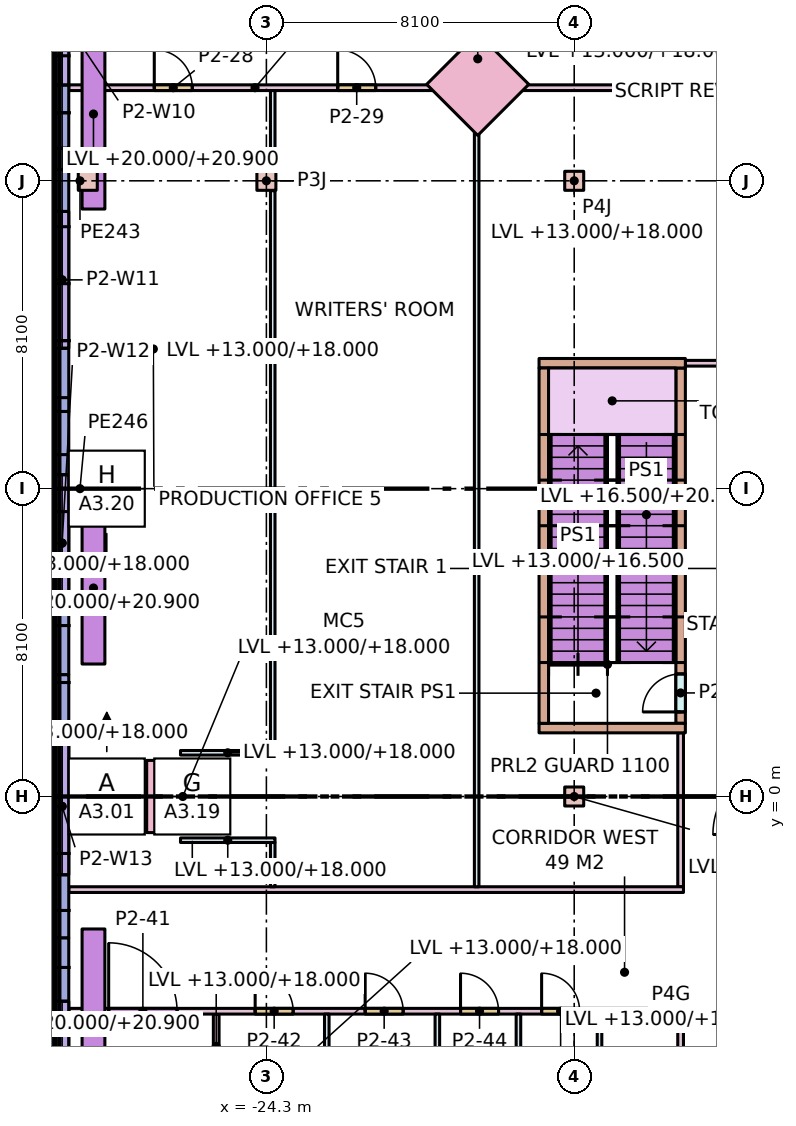
"""IFC4 building model, lengths in metres.
Left out: names, types, materials, properties, quantities, classifications, styles, units other than length and angle.
Written with IfcOpenShell. Run it as: python <this file> out.ifc"""

import sys

from ifc_helpers import new_model, si_unit, direction, frame, frame_2d, origin, origin_2d, place, context, subcontext, project, spatial, rectangle, extrude, element, fill, save


model = new_model("IFC4")
c1 = context("Model", 3, precision=1e-05, world=origin(), true_north=direction((0.0, 1.0)))
c2 = subcontext(c1, "Body", "Model", "MODEL_VIEW")
j1 = project(units=[si_unit("LENGTHUNIT", "METRE"), si_unit("PLANEANGLEUNIT", "RADIAN")], contexts=[c1])
p1 = place(None, origin())
s1 = spatial("IfcSite", under=j1, at=p1, CompositionType="ELEMENT")
p2 = place(p1, origin())
s2 = spatial("IfcBuilding", under=s1, at=p2, CompositionType="ELEMENT")
p3 = place(p2, frame((0.0, 0.0, 13.0)))
s3 = spatial("IfcBuildingStorey", under=s2, at=p3, CompositionType="ELEMENT", Elevation=13.0)
p4 = place(p3, frame((-24.3, 16.2, 0.0), z_axis=(0.0, 0.0, 1.0), x_axis=(1.0, 0.0, 0.0)))
e1 = element("IfcColumn", 1, at=p4, inside=s3, PredefinedType="COLUMN", context=c2, shape_type="SweptSolid", body=[
    extrude(rectangle(XDim=0.5, YDim=0.5, at=origin_2d()), origin(), (0.0, 0.0, 1.0), 7.0),
])
for number, where, z_axis, x_axis in (
    (2, (-16.2, 0.0, 0.0), (0.0, 0.0, 1.0), (1.0, 0.0, 0.0)),
    (3, (-16.2, 16.2, 0.0), (0.0, 0.0, 1.0), (1.0, 0.0, 0.0)),
):
    element("IfcColumn", number, at=place(p3, frame(where, z_axis=z_axis, x_axis=x_axis)), inside=s3, PredefinedType="COLUMN", context=c2, shape_type="SweptSolid", body=[
        extrude(rectangle(XDim=0.5, YDim=0.5, at=origin_2d()), origin(), (0.0, 0.0, 1.0), 5.0),
    ])
for number, where, z_axis, x_axis in (
    (4, (-29.0, 16.2, 0.0), (0.0, 0.0, 1.0), (1.0, 0.0, 0.0)),
    (5, (-29.0, 8.1, 0.0), (0.0, 0.0, 1.0), (1.0, 0.0, 0.0)),
):
    element("IfcColumn", number, at=place(p3, frame(where, z_axis=z_axis, x_axis=x_axis)), inside=s3, PredefinedType="COLUMN", context=c2, shape_type="SweptSolid", body=[
        extrude(rectangle(XDim=0.5, YDim=0.5, at=origin_2d()), origin(), (0.0, 0.0, 1.0), 7.0),
    ])
for number, where, z_axis, x_axis in (
    (6, (-18.738, 18.738, 0.0), (0.0, 0.0, 1.0), (-0.707, -0.707, 0.0)),
    (7, (-26.5, 0.0, 0.0), (0.0, 0.0, 1.0), (0.0, -1.0, 0.0)),
):
    element("IfcColumn", number, at=place(p3, frame(where, z_axis=z_axis, x_axis=x_axis)), inside=s3, PredefinedType="COLUMN", context=c2, shape_type="SweptSolid", body=[
        extrude(rectangle(XDim=1.9, YDim=1.9, at=origin_2d()), origin(), (0.0, 0.0, 1.0), 5.0),
    ])
p5 = place(p3, frame((-29.675, 23.984, 0.0), z_axis=(0.0, 0.0, 1.0), x_axis=(0.0, -1.0, 0.0)))
e8 = element("IfcWall", 8, at=p5, inside=s3, PredefinedType="STANDARD", context=c2, shape_type="SweptSolid", body=[
    extrude(rectangle(XDim=6.927, YDim=0.35, at=frame_2d((3.463, 0.0))), origin(), (0.0, 0.0, 1.0), 5.0),
])
p6 = place(p5, frame((1.663, 0.0, 1.0)))
e9 = element("IfcOpeningElement", 9, at=p6, cuts=e8, PredefinedType="OPENING", context=c2, shape_type="SweptSolid", body=[
    extrude(rectangle(XDim=3.6, YDim=4.0, at=frame_2d((1.8, 2.0))), frame((0.0, 0.185, 0.0), z_axis=(0.0, -1.0, 0.0), x_axis=(1.0, 0.0, 0.0)), (0.0, 0.0, 1.0), 0.37),
])
p7 = place(p3, frame((-29.675, 17.057, 0.0), z_axis=(0.0, 0.0, 1.0), x_axis=(0.0, -1.0, 0.0)))
e10 = element("IfcWall", 10, at=p7, inside=s3, PredefinedType="STANDARD", context=c2, shape_type="SweptSolid", body=[
    extrude(rectangle(XDim=6.927, YDim=0.35, at=frame_2d((3.463, 0.0))), origin(), (0.0, 0.0, 1.0), 5.0),
])
p8 = place(p7, frame((1.663, 0.0, 1.0)))
e11 = element("IfcOpeningElement", 11, at=p8, cuts=e10, PredefinedType="OPENING", context=c2, shape_type="SweptSolid", body=[
    extrude(rectangle(XDim=3.6, YDim=4.0, at=frame_2d((1.8, 2.0))), frame((0.0, 0.185, 0.0), z_axis=(0.0, -1.0, 0.0), x_axis=(1.0, 0.0, 0.0)), (0.0, 0.0, 1.0), 0.37),
])
p9 = place(p3, frame((-29.675, 10.13, 0.0), z_axis=(0.0, 0.0, 1.0), x_axis=(0.0, -1.0, 0.0)))
e12 = element("IfcWall", 12, at=p9, inside=s3, PredefinedType="STANDARD", context=c2, shape_type="SweptSolid", body=[
    extrude(rectangle(XDim=6.927, YDim=0.35, at=frame_2d((3.463, 0.0))), origin(), (0.0, 0.0, 1.0), 5.0),
])
p10 = place(p9, frame((1.663, 0.0, 1.0)))
e13 = element("IfcOpeningElement", 13, at=p10, cuts=e12, PredefinedType="OPENING", context=c2, shape_type="SweptSolid", body=[
    extrude(rectangle(XDim=3.6, YDim=4.0, at=frame_2d((1.8, 2.0))), frame((0.0, 0.185, 0.0), z_axis=(0.0, -1.0, 0.0), x_axis=(1.0, 0.0, 0.0)), (0.0, 0.0, 1.0), 0.37),
])
p11 = place(p3, frame((-29.675, 3.204, 0.0), z_axis=(0.0, 0.0, 1.0), x_axis=(0.0, -1.0, 0.0)))
e14 = element("IfcWall", 14, at=p11, inside=s3, PredefinedType="STANDARD", context=c2, shape_type="SweptSolid", body=[
    extrude(rectangle(XDim=6.927, YDim=0.35, at=frame_2d((3.463, 0.0))), origin(), (0.0, 0.0, 1.0), 5.0),
])
p12 = place(p11, frame((1.663, 0.0, 1.0)))
e15 = element("IfcOpeningElement", 15, at=p12, cuts=e14, PredefinedType="OPENING", context=c2, shape_type="SweptSolid", body=[
    extrude(rectangle(XDim=3.6, YDim=4.0, at=frame_2d((1.8, 2.0))), frame((0.0, 0.185, 0.0), z_axis=(0.0, -1.0, 0.0), x_axis=(1.0, 0.0, 0.0)), (0.0, 0.0, 1.0), 0.37),
])
p13 = place(p3, frame((-29.675, -3.723, 0.0), z_axis=(0.0, 0.0, 1.0), x_axis=(0.0, -1.0, 0.0)))
e16 = element("IfcWall", 16, at=p13, inside=s3, PredefinedType="STANDARD", context=c2, shape_type="SweptSolid", body=[
    extrude(rectangle(XDim=6.927, YDim=0.35, at=frame_2d((3.463, 0.0))), origin(), (0.0, 0.0, 1.0), 5.0),
])
p14 = place(p13, frame((1.663, 0.0, 1.0)))
e17 = element("IfcOpeningElement", 17, at=p14, cuts=e16, PredefinedType="OPENING", context=c2, shape_type="SweptSolid", body=[
    extrude(rectangle(XDim=3.6, YDim=4.0, at=frame_2d((1.8, 2.0))), frame((0.0, 0.185, 0.0), z_axis=(0.0, -1.0, 0.0), x_axis=(1.0, 0.0, 0.0)), (0.0, 0.0, 1.0), 0.37),
])
for number, where, z_axis, x_axis in (
    (18, (-28.85, 20.458, 7.0), (0.0, 0.0, 1.0), (0.0, -1.0, 0.0)),
    (19, (-28.85, 8.486, 7.0), (0.0, 0.0, 1.0), (0.0, -1.0, 0.0)),
    (20, (-28.85, -3.486, 7.0), (0.0, 0.0, 1.0), (0.0, -1.0, 0.0)),
):
    element("IfcWall", number, at=place(p3, frame(where, z_axis=z_axis, x_axis=x_axis)), inside=s3, PredefinedType="PARAPET", context=c2, shape_type="SweptSolid", body=[
        extrude(rectangle(XDim=5.0, YDim=0.6, at=frame_2d((2.5, 0.0))), origin(), (0.0, 0.0, 1.0), 0.9),
    ])
p15 = place(p3, frame((-22.711, -10.952, 0.0), z_axis=(0.0, 0.0, 1.0), x_axis=(0.0, 1.0, 0.0)))
e21 = element("IfcWall", 21, at=p15, inside=s3, PredefinedType="PARTITIONING", context=c2, shape_type="SweptSolid", body=[
    extrude(rectangle(XDim=5.227, YDim=0.12, at=frame_2d((2.614, 0.0))), origin(), (0.0, 0.0, 1.0), 6.68),
])
p16 = place(p3, frame((-25.621, -7.425, 0.0), z_axis=(0.0, 0.0, 1.0), x_axis=(0.0, 1.0, 0.0)))
e22 = element("IfcWall", 22, at=p16, inside=s3, PredefinedType="PARTITIONING", context=c2, shape_type="SweptSolid", body=[
    extrude(rectangle(XDim=1.7, YDim=0.15, at=frame_2d((0.85, 0.0))), origin(), (0.0, 0.0, 1.0), 5.0),
])
p17 = place(p3, frame((-29.5, -5.65, 0.0), z_axis=(0.0, 0.0, 1.0), x_axis=(1.0, 0.0, 0.0)))
e23 = element("IfcWall", 23, at=p17, inside=s3, PredefinedType="PARTITIONING", context=c2, shape_type="SweptSolid", body=[
    extrude(rectangle(XDim=16.175, YDim=0.15, at=frame_2d((8.087, 0.0))), origin(), (0.0, 0.0, 1.0), 5.0),
])
p18 = place(p17, frame((1.05, 0.0, 0.0)))
e24 = element("IfcOpeningElement", 24, at=p18, cuts=e23, PredefinedType="OPENING", context=c2, shape_type="SweptSolid", body=[
    extrude(rectangle(XDim=1.8, YDim=2.4, at=frame_2d((0.9, 1.2))), frame((0.0, 0.085, 0.0), z_axis=(0.0, -1.0, 0.0), x_axis=(1.0, 0.0, 0.0)), (0.0, 0.0, 1.0), 0.17),
])
p19 = place(p17, frame((4.905, 0.0, 0.0)))
e25 = element("IfcOpeningElement", 25, at=p19, cuts=e23, PredefinedType="OPENING", context=c2, shape_type="SweptSolid", body=[
    extrude(rectangle(XDim=1.0, YDim=2.1, at=frame_2d((0.5, 1.05))), frame((0.0, 0.085, 0.0), z_axis=(0.0, -1.0, 0.0), x_axis=(1.0, 0.0, 0.0)), (0.0, 0.0, 1.0), 0.17),
])
p20 = place(p17, frame((7.799, 0.0, 0.0)))
e26 = element("IfcOpeningElement", 26, at=p20, cuts=e23, PredefinedType="OPENING", context=c2, shape_type="SweptSolid", body=[
    extrude(rectangle(XDim=1.0, YDim=2.1, at=frame_2d((0.5, 1.05))), frame((0.0, 0.085, 0.0), z_axis=(0.0, -1.0, 0.0), x_axis=(1.0, 0.0, 0.0)), (0.0, 0.0, 1.0), 0.17),
])
p21 = place(p17, frame((10.309, 0.0, 0.0)))
e27 = element("IfcOpeningElement", 27, at=p21, cuts=e23, PredefinedType="OPENING", context=c2, shape_type="SweptSolid", body=[
    extrude(rectangle(XDim=1.0, YDim=2.1, at=frame_2d((0.5, 1.05))), frame((0.0, 0.085, 0.0), z_axis=(0.0, -1.0, 0.0), x_axis=(1.0, 0.0, 0.0)), (0.0, 0.0, 1.0), 0.17),
])
p22 = place(p17, frame((12.442, 0.0, 0.0)))
e28 = element("IfcOpeningElement", 28, at=p22, cuts=e23, PredefinedType="OPENING", context=c2, shape_type="SweptSolid", body=[
    extrude(rectangle(XDim=1.0, YDim=2.1, at=frame_2d((0.5, 1.05))), frame((0.0, 0.085, 0.0), z_axis=(0.0, -1.0, 0.0), x_axis=(1.0, 0.0, 0.0)), (0.0, 0.0, 1.0), 0.17),
])
p23 = place(p3, frame((-29.5, 18.65, 0.0), z_axis=(0.0, 0.0, 1.0), x_axis=(1.0, 0.0, 0.0)))
e29 = element("IfcWall", 29, at=p23, inside=s3, PredefinedType="PARTITIONING", context=c2, shape_type="SweptSolid", body=[
    extrude(rectangle(XDim=9.802, YDim=0.15, at=frame_2d((4.901, 0.0))), origin(), (0.0, 0.0, 1.0), 5.0),
])
p24 = place(p23, frame((2.25, 0.0, 0.0)))
e30 = element("IfcOpeningElement", 30, at=p24, cuts=e29, PredefinedType="OPENING", context=c2, shape_type="SweptSolid", body=[
    extrude(rectangle(XDim=1.0, YDim=2.1, at=frame_2d((0.5, 1.05))), frame((0.0, 0.085, 0.0), z_axis=(0.0, -1.0, 0.0), x_axis=(1.0, 0.0, 0.0)), (0.0, 0.0, 1.0), 0.17),
])
p25 = place(p23, frame((7.077, 0.0, 0.0)))
e31 = element("IfcOpeningElement", 31, at=p25, cuts=e29, PredefinedType="OPENING", context=c2, shape_type="SweptSolid", body=[
    extrude(rectangle(XDim=1.0, YDim=2.1, at=frame_2d((0.5, 1.05))), frame((0.0, 0.085, 0.0), z_axis=(0.0, -1.0, 0.0), x_axis=(1.0, 0.0, 0.0)), (0.0, 0.0, 1.0), 0.17),
])
p26 = place(p3, frame((-17.778, 18.65, 0.0), z_axis=(0.0, 0.0, 1.0), x_axis=(1.0, 0.0, 0.0)))
e32 = element("IfcWall", 32, at=p26, inside=s3, PredefinedType="PARTITIONING", context=c2, shape_type="SweptSolid", body=[
    extrude(rectangle(XDim=20.303, YDim=0.15, at=frame_2d((10.152, 0.0))), origin(), (0.0, 0.0, 1.0), 5.0),
])
p27 = place(p26, frame((9.65, 0.0, 0.0)))
e33 = element("IfcOpeningElement", 33, at=p27, cuts=e32, PredefinedType="OPENING", context=c2, shape_type="SweptSolid", body=[
    extrude(rectangle(XDim=1.0, YDim=2.1, at=frame_2d((0.5, 1.05))), frame((0.0, 0.085, 0.0), z_axis=(0.0, -1.0, 0.0), x_axis=(1.0, 0.0, 0.0)), (0.0, 0.0, 1.0), 0.17),
])
p28 = place(p3, frame((-13.4, 1.925, 0.0), z_axis=(0.0, 0.0, 1.0), x_axis=(0.0, 1.0, 0.0)))
e34 = element("IfcWall", 34, at=p28, inside=s3, PredefinedType="STANDARD", context=c2, shape_type="SweptSolid", body=[
    extrude(rectangle(XDim=9.35, YDim=0.25, at=frame_2d((4.675, 0.0))), origin(), (0.0, 0.0, 1.0), 5.0),
])
p29 = place(p28, frame((0.3, 0.0, 0.0)))
e35 = element("IfcOpeningElement", 35, at=p29, cuts=e34, PredefinedType="OPENING", context=c2, shape_type="SweptSolid", body=[
    extrude(rectangle(XDim=1.0, YDim=2.1, at=frame_2d((0.5, 1.05))), frame((0.0, 0.135, 0.0), z_axis=(0.0, -1.0, 0.0), x_axis=(1.0, 0.0, 0.0)), (0.0, 0.0, 1.0), 0.27),
])
for number, where, z_axis, x_axis in (
    (36, (-17.125, 1.8, 0.0), (0.0, 0.0, 1.0), (1.0, 0.0, 0.0)),
    (37, (-17.125, 11.4, 0.0), (0.0, 0.0, 1.0), (1.0, 0.0, 0.0)),
):
    element("IfcWall", number, at=place(p3, frame(where, z_axis=z_axis, x_axis=x_axis)), inside=s3, PredefinedType="STANDARD", context=c2, shape_type="SweptSolid", body=[
        extrude(rectangle(XDim=3.85, YDim=0.25, at=frame_2d((1.925, 0.0))), origin(), (0.0, 0.0, 1.0), 5.0),
    ])
p30 = place(p3, frame((-17.0, 1.925, 0.0), z_axis=(0.0, 0.0, 1.0), x_axis=(0.0, 1.0, 0.0)))
e38 = element("IfcWall", 38, at=p30, inside=s3, PredefinedType="STANDARD", context=c2, shape_type="SweptSolid", body=[
    extrude(rectangle(XDim=9.35, YDim=0.25, at=frame_2d((4.675, 0.0))), origin(), (0.0, 0.0, 1.0), 5.0),
])
p31 = place(p3, frame((-13.4, -11.325, 0.0), z_axis=(0.0, 0.0, 1.0), x_axis=(0.0, 1.0, 0.0)))
e39 = element("IfcWall", 39, at=p31, inside=s3, PredefinedType="PARTITIONING", context=c2, shape_type="SweptSolid", body=[
    extrude(rectangle(XDim=5.6, YDim=0.15, at=frame_2d((2.8, 0.0))), origin(), (0.0, 0.0, 1.0), 5.0),
])
p32 = place(p31, frame((2.25, 0.0, 0.0)))
e40 = element("IfcOpeningElement", 40, at=p32, cuts=e39, PredefinedType="OPENING", context=c2, shape_type="SweptSolid", body=[
    extrude(rectangle(XDim=1.0, YDim=2.1, at=frame_2d((0.5, 1.05))), frame((0.0, 0.085, 0.0), z_axis=(0.0, -1.0, 0.0), x_axis=(1.0, 0.0, 0.0)), (0.0, 0.0, 1.0), 0.17),
])
p33 = place(p3, frame((-13.275, 11.4, 0.0), z_axis=(0.0, 0.0, 1.0), x_axis=(1.0, 0.0, 0.0)))
e41 = element("IfcWall", 41, at=p33, inside=s3, PredefinedType="PARTITIONING", context=c2, shape_type="SweptSolid", body=[
    extrude(rectangle(XDim=15.8, YDim=0.15, at=frame_2d((7.9, 0.0))), origin(), (0.0, 0.0, 1.0), 5.0),
])
p34 = place(p3, frame((-13.4, -2.375, 0.0), z_axis=(0.0, 0.0, 1.0), x_axis=(0.0, 1.0, 0.0)))
e42 = element("IfcWall", 42, at=p34, inside=s3, PredefinedType="PARTITIONING", context=c2, shape_type="SweptSolid", body=[
    extrude(rectangle(XDim=4.05, YDim=0.15, at=frame_2d((2.025, 0.0))), origin(), (0.0, 0.0, 1.0), 5.0),
])
for number, where, z_axis, x_axis in (
    (43, (-19.801, -18.678, 0.0), (0.0, 0.0, 1.0), (0.0, 1.0, 0.0)),
    (44, (-17.667, -18.678, 0.0), (0.0, 0.0, 1.0), (0.0, 1.0, 0.0)),
):
    element("IfcWall", number, at=place(p3, frame(where, z_axis=z_axis, x_axis=x_axis)), inside=s3, PredefinedType="PARTITIONING", context=c2, shape_type="SweptSolid", body=[
        extrude(rectangle(XDim=12.953, YDim=0.12, at=frame_2d((6.477, 0.0))), origin(), (0.0, 0.0, 1.0), 5.0),
    ])
p35 = place(p3, frame((-15.534, -7.64, 0.0), z_axis=(0.0, 0.0, 1.0), x_axis=(0.0, 1.0, 0.0)))
e45 = element("IfcWall", 45, at=p35, inside=s3, PredefinedType="PARTITIONING", context=c2, shape_type="SweptSolid", body=[
    extrude(rectangle(XDim=1.915, YDim=0.12, at=frame_2d((0.958, 0.0))), origin(), (0.0, 0.0, 1.0), 5.0),
])
for number, where, z_axis, x_axis in (
    (46, (-26.56, -1.15, 0.0), (0.0, 0.0, 1.0), (1.0, 0.0, 0.0)),
    (47, (-26.56, 1.15, 0.0), (0.0, 0.0, 1.0), (1.0, 0.0, 0.0)),
):
    element("IfcWall", number, at=place(p3, frame(where, z_axis=z_axis, x_axis=x_axis)), inside=s3, PredefinedType="PARTITIONING", context=c2, shape_type="SweptSolid", body=[
        extrude(rectangle(XDim=2.487, YDim=0.12, at=frame_2d((1.243, 0.0))), origin(), (0.0, 0.0, 1.0), 5.0),
    ])
p36 = place(p3, frame((-24.133, -2.375, 0.0), z_axis=(0.0, 0.0, 1.0), x_axis=(0.0, 1.0, 0.0)))
e48 = element("IfcWall", 48, at=p36, inside=s3, PredefinedType="PARTITIONING", context=c2, shape_type="SweptSolid", body=[
    extrude(rectangle(XDim=1.165, YDim=0.12, at=frame_2d((0.583, 0.0))), origin(), (0.0, 0.0, 1.0), 6.68),
])
p37 = place(p3, frame((-24.133, 1.21, 0.0), z_axis=(0.0, 0.0, 1.0), x_axis=(0.0, 1.0, 0.0)))
e49 = element("IfcWall", 49, at=p37, inside=s3, PredefinedType="PARTITIONING", context=c2, shape_type="SweptSolid", body=[
    extrude(rectangle(XDim=6.308, YDim=0.12, at=frame_2d((3.154, 0.0))), origin(), (0.0, 0.0, 1.0), 6.68),
])
p38 = place(p3, frame((-24.133, 7.518, 0.0), z_axis=(0.0, 0.0, 1.0), x_axis=(0.0, 1.0, 0.0)))
e50 = element("IfcWall", 50, at=p38, inside=s3, PredefinedType="PARTITIONING", context=c2, shape_type="SweptSolid", body=[
    extrude(rectangle(XDim=8.422, YDim=0.12, at=frame_2d((4.211, 0.0))), origin(), (0.0, 0.0, 1.0), 5.0),
])
p39 = place(p3, frame((-24.133, 16.46, 0.0), z_axis=(0.0, 0.0, 1.0), x_axis=(0.0, 1.0, 0.0)))
e51 = element("IfcWall", 51, at=p39, inside=s3, PredefinedType="PARTITIONING", context=c2, shape_type="SweptSolid", body=[
    extrude(rectangle(XDim=2.115, YDim=0.12, at=frame_2d((1.058, 0.0))), origin(), (0.0, 0.0, 1.0), 6.68),
])
p40 = place(p3, frame((-29.5, -2.45, 0.0), z_axis=(0.0, 0.0, 1.0), x_axis=(1.0, 0.0, 0.0)))
e52 = element("IfcWall", 52, at=p40, inside=s3, PredefinedType="PARTITIONING", context=c2, shape_type="SweptSolid", body=[
    extrude(rectangle(XDim=16.175, YDim=0.15, at=frame_2d((8.087, 0.0))), origin(), (0.0, 0.0, 1.0), 5.0),
])
p41 = place(p3, frame((-18.767, -2.375, 0.0), z_axis=(0.0, 0.0, 1.0), x_axis=(0.0, 1.0, 0.0)))
e53 = element("IfcWall", 53, at=p41, inside=s3, PredefinedType="PARTITIONING", context=c2, shape_type="SweptSolid", body=[
    extrude(rectangle(XDim=20.153, YDim=0.12, at=frame_2d((10.077, 0.0))), origin(), (0.0, 0.0, 1.0), 5.0),
])
p42 = place(p6, origin())
e54 = element("IfcWindow", 54, at=p42, inside=s3, PartitioningType="SINGLE_PANEL", PredefinedType="WINDOW", context=c2, shape_type="SweptSolid", body=[
    extrude(rectangle(XDim=3.6, YDim=4.0, at=frame_2d((1.8, 2.0))), frame((0.0, 0.03, 0.0), z_axis=(0.0, -1.0, 0.0), x_axis=(1.0, 0.0, 0.0)), (0.0, 0.0, 1.0), 0.06),
])
fill(e9, e54)
p43 = place(p8, origin())
e55 = element("IfcWindow", 55, at=p43, inside=s3, PartitioningType="SINGLE_PANEL", PredefinedType="WINDOW", context=c2, shape_type="SweptSolid", body=[
    extrude(rectangle(XDim=3.6, YDim=4.0, at=frame_2d((1.8, 2.0))), frame((0.0, 0.03, 0.0), z_axis=(0.0, -1.0, 0.0), x_axis=(1.0, 0.0, 0.0)), (0.0, 0.0, 1.0), 0.06),
])
fill(e11, e55)
p44 = place(p10, origin())
e56 = element("IfcWindow", 56, at=p44, inside=s3, PartitioningType="SINGLE_PANEL", PredefinedType="WINDOW", context=c2, shape_type="SweptSolid", body=[
    extrude(rectangle(XDim=3.6, YDim=4.0, at=frame_2d((1.8, 2.0))), frame((0.0, 0.03, 0.0), z_axis=(0.0, -1.0, 0.0), x_axis=(1.0, 0.0, 0.0)), (0.0, 0.0, 1.0), 0.06),
])
fill(e13, e56)
p45 = place(p12, origin())
e57 = element("IfcWindow", 57, at=p45, inside=s3, PartitioningType="SINGLE_PANEL", PredefinedType="WINDOW", context=c2, shape_type="SweptSolid", body=[
    extrude(rectangle(XDim=3.6, YDim=4.0, at=frame_2d((1.8, 2.0))), frame((0.0, 0.03, 0.0), z_axis=(0.0, -1.0, 0.0), x_axis=(1.0, 0.0, 0.0)), (0.0, 0.0, 1.0), 0.06),
])
fill(e15, e57)
p46 = place(p14, origin())
e58 = element("IfcWindow", 58, at=p46, inside=s3, PartitioningType="SINGLE_PANEL", PredefinedType="WINDOW", context=c2, shape_type="SweptSolid", body=[
    extrude(rectangle(XDim=3.6, YDim=4.0, at=frame_2d((1.8, 2.0))), frame((0.0, 0.03, 0.0), z_axis=(0.0, -1.0, 0.0), x_axis=(1.0, 0.0, 0.0)), (0.0, 0.0, 1.0), 0.06),
])
fill(e17, e58)
p47 = place(p29, origin())
e59 = element("IfcDoor", 59, at=p47, inside=s3, OperationType="SINGLE_SWING_LEFT", PredefinedType="DOOR", context=c2, shape_type="SweptSolid", body=[
    extrude(rectangle(XDim=1.0, YDim=2.1, at=frame_2d((0.5, 1.05))), frame((0.0, 0.025, 0.0), z_axis=(0.0, -1.0, 0.0), x_axis=(1.0, 0.0, 0.0)), (0.0, 0.0, 1.0), 0.05),
])
fill(e35, e59)
p48 = place(p24, origin())
e60 = element("IfcDoor", 60, at=p48, inside=s3, OperationType="SINGLE_SWING_LEFT", PredefinedType="DOOR", context=c2, shape_type="SweptSolid", body=[
    extrude(rectangle(XDim=1.0, YDim=2.1, at=frame_2d((0.5, 1.05))), frame((0.0, 0.025, 0.0), z_axis=(0.0, -1.0, 0.0), x_axis=(1.0, 0.0, 0.0)), (0.0, 0.0, 1.0), 0.05),
])
fill(e30, e60)
p49 = place(p25, origin())
e61 = element("IfcDoor", 61, at=p49, inside=s3, OperationType="SINGLE_SWING_LEFT", PredefinedType="DOOR", context=c2, shape_type="SweptSolid", body=[
    extrude(rectangle(XDim=1.0, YDim=2.1, at=frame_2d((0.5, 1.05))), frame((0.0, 0.025, 0.0), z_axis=(0.0, -1.0, 0.0), x_axis=(1.0, 0.0, 0.0)), (0.0, 0.0, 1.0), 0.05),
])
fill(e31, e61)
p50 = place(p18, origin())
e62 = element("IfcDoor", 62, at=p50, inside=s3, OperationType="SINGLE_SWING_LEFT", PredefinedType="DOOR", context=c2, shape_type="SweptSolid", body=[
    extrude(rectangle(XDim=1.8, YDim=2.4, at=frame_2d((0.9, 1.2))), frame((0.0, 0.025, 0.0), z_axis=(0.0, -1.0, 0.0), x_axis=(1.0, 0.0, 0.0)), (0.0, 0.0, 1.0), 0.05),
])
fill(e24, e62)
p51 = place(p19, origin())
e63 = element("IfcDoor", 63, at=p51, inside=s3, OperationType="SINGLE_SWING_LEFT", PredefinedType="DOOR", context=c2, shape_type="SweptSolid", body=[
    extrude(rectangle(XDim=1.0, YDim=2.1, at=frame_2d((0.5, 1.05))), frame((0.0, 0.025, 0.0), z_axis=(0.0, -1.0, 0.0), x_axis=(1.0, 0.0, 0.0)), (0.0, 0.0, 1.0), 0.05),
])
fill(e25, e63)
p52 = place(p20, origin())
e64 = element("IfcDoor", 64, at=p52, inside=s3, OperationType="SINGLE_SWING_LEFT", PredefinedType="DOOR", context=c2, shape_type="SweptSolid", body=[
    extrude(rectangle(XDim=1.0, YDim=2.1, at=frame_2d((0.5, 1.05))), frame((0.0, 0.025, 0.0), z_axis=(0.0, -1.0, 0.0), x_axis=(1.0, 0.0, 0.0)), (0.0, 0.0, 1.0), 0.05),
])
fill(e26, e64)
p53 = place(p21, origin())
e65 = element("IfcDoor", 65, at=p53, inside=s3, OperationType="SINGLE_SWING_LEFT", PredefinedType="DOOR", context=c2, shape_type="SweptSolid", body=[
    extrude(rectangle(XDim=1.0, YDim=2.1, at=frame_2d((0.5, 1.05))), frame((0.0, 0.025, 0.0), z_axis=(0.0, -1.0, 0.0), x_axis=(1.0, 0.0, 0.0)), (0.0, 0.0, 1.0), 0.05),
])
fill(e27, e65)
p54 = place(p22, origin())
e66 = element("IfcDoor", 66, at=p54, inside=s3, OperationType="SINGLE_SWING_LEFT", PredefinedType="DOOR", context=c2, shape_type="SweptSolid", body=[
    extrude(rectangle(XDim=1.0, YDim=2.1, at=frame_2d((0.5, 1.05))), frame((0.0, 0.025, 0.0), z_axis=(0.0, -1.0, 0.0), x_axis=(1.0, 0.0, 0.0)), (0.0, 0.0, 1.0), 0.05),
])
fill(e28, e66)
save(model, sys.argv[1])
